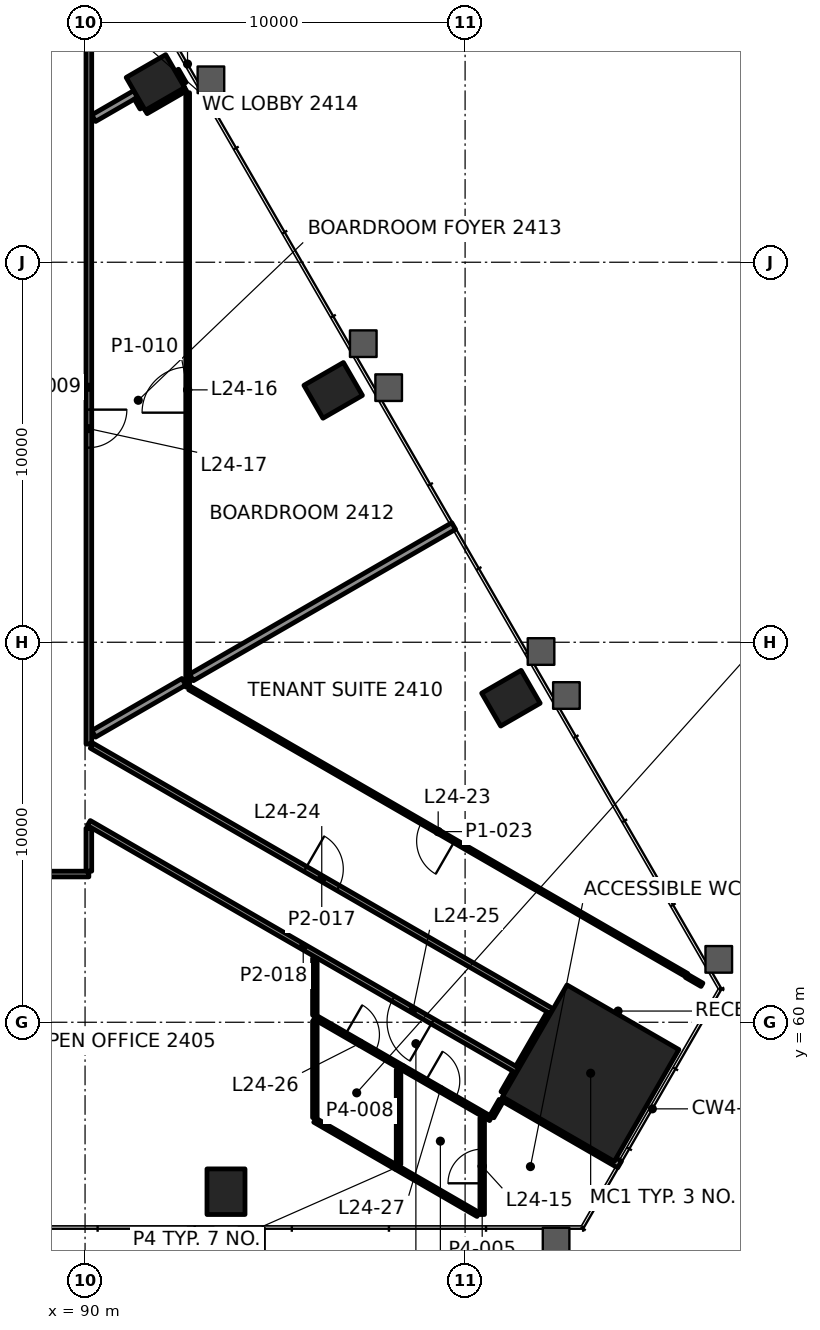
"""IFC4 building model, lengths in metres.
Left out: names, types, materials, properties, quantities, classifications, styles, units other than length and angle.
Written with IfcOpenShell. Run it as: python <this file> out.ifc"""

import sys

from ifc_helpers import new_model, si_unit, direction, frame, frame_2d, origin, origin_2d, place, context, subcontext, project, spatial, rectangle, extrude, element, fill, save


model = new_model("IFC4")
c1 = context("Model", 3, precision=1e-05, world=origin(), true_north=direction((0.0, 1.0)))
c2 = subcontext(c1, "Body", "Model", "MODEL_VIEW")
j1 = project(units=[si_unit("LENGTHUNIT", "METRE"), si_unit("PLANEANGLEUNIT", "RADIAN")], contexts=[c1])
p1 = place(None, origin())
s1 = spatial("IfcSite", under=j1, at=p1, CompositionType="ELEMENT")
p2 = place(p1, origin())
s2 = spatial("IfcBuilding", under=s1, at=p2, CompositionType="ELEMENT")
p3 = place(p2, frame((0.0, 0.0, 107.2)))
s3 = spatial("IfcBuildingStorey", under=s2, at=p3, CompositionType="ELEMENT", Elevation=107.2)
p4 = place(p3, frame((103.304, 58.659, 0.0), z_axis=(0.0, 0.0, 1.0), x_axis=(0.5, 0.866025403784, 0.0)))
e1 = element("IfcColumn", 1, at=p4, inside=s3, PredefinedType="COLUMN", context=c2, shape_type="SweptSolid", body=[
    extrude(rectangle(XDim=3.4, YDim=3.4, at=origin_2d()), origin(), (0.0, 0.0, 1.0), 4.2),
])
for number, where, z_axis, x_axis in (
    (2, (93.708, 55.541, -0.0), (0.0, 0.0, 1.0), (1.0, 0.0, 0.0)),
    (3, (101.206, 68.528, -0.0), (0.0, 0.0, 1.0), (-0.5, 0.866, 0.0)),
    (4, (96.529, 76.628, -0.0), (0.0, 0.0, 1.0), (-0.5, 0.866, 0.0)),
    (5, (91.852, 84.729, -0.0), (0.0, 0.0, 1.0), (-0.5, 0.866, 0.0)),
):
    element("IfcColumn", number, at=place(p3, frame(where, z_axis=z_axis, x_axis=x_axis)), inside=s3, PredefinedType="COLUMN", context=c2, shape_type="SweptSolid", body=[
        extrude(rectangle(XDim=1.0, YDim=1.2, at=origin_2d()), origin(), (0.0, 0.0, 1.0), 4.2),
    ])
p5 = place(p3, frame((90.099, 63.9, 0.0), z_axis=(0.0, 0.0, 1.0), x_axis=(-1.0, 0.0, 0.0)))
e6 = element("IfcWall", 6, at=p5, inside=s3, PredefinedType="PARTITIONING", context=c2, shape_type="SweptSolid", body=[
    extrude(rectangle(XDim=30.199, YDim=0.15, at=frame_2d((15.099, 0.0))), origin(), (0.0, 0.0, 1.0), 3.4),
])
p6 = place(p5, frame((5.882, 0.0, 0.0)))
e7 = element("IfcOpeningElement", 7, at=p6, cuts=e6, PredefinedType="OPENING", context=c2, shape_type="SweptSolid", body=[
    extrude(rectangle(XDim=1.2, YDim=2.1, at=frame_2d((0.6, 1.05))), frame((0.0, 0.085, 0.0), z_axis=(0.0, -1.0, 0.0), x_axis=(1.0, 0.0, 0.0)), (0.0, 0.0, 1.0), 0.17),
])
p7 = place(p5, frame((20.346, 0.0, 0.0)))
e8 = element("IfcOpeningElement", 8, at=p7, cuts=e6, PredefinedType="OPENING", context=c2, shape_type="SweptSolid", body=[
    extrude(rectangle(XDim=1.2, YDim=2.1, at=frame_2d((0.6, 1.05))), frame((0.0, 0.085, 0.0), z_axis=(0.0, -1.0, 0.0), x_axis=(1.0, 0.0, 0.0)), (0.0, 0.0, 1.0), 0.17),
])
p8 = place(p3, frame((90.227, 67.59, 0.0), z_axis=(0.0, 0.0, 1.0), x_axis=(0.866003105128, 0.500038620418, 0.0)))
e9 = element("IfcWall", 9, at=p8, inside=s3, PredefinedType="PARTITIONING", context=c2, shape_type="SweptSolid", body=[
    extrude(rectangle(XDim=2.74, YDim=0.2, at=frame_2d((1.37, 0.0))), origin(), (0.0, 0.0, 1.0), 3.4),
])
p9 = place(p3, frame((91.583, 83.997, 0.0), z_axis=(0.0, 0.0, 1.0), x_axis=(0.866066905393, 0.499928110214, 0.0)))
e10 = element("IfcWall", 10, at=p9, inside=s3, PredefinedType="PARTITIONING", context=c2, shape_type="SweptSolid", body=[
    extrude(rectangle(XDim=1.199, YDim=0.2, at=frame_2d((0.6, 0.0))), origin(), (0.0, 0.0, 1.0), 3.165),
])
p10 = place(p3, frame((90.227, 83.792, 0.0), z_axis=(0.0, 0.0, 1.0), x_axis=(0.866067665301, 0.499926793761, 0.0)))
e11 = element("IfcWall", 11, at=p10, inside=s3, PredefinedType="PARTITIONING", context=c2, shape_type="SweptSolid", body=[
    extrude(rectangle(XDim=1.276, YDim=0.2, at=frame_2d((0.638, 0.0))), origin(), (0.0, 0.0, 1.0), 3.4),
])
p11 = place(p3, frame((100.704, 57.516, 0.0), z_axis=(0.0, 0.0, 1.0), x_axis=(0.499679281737, 0.866210491395, 0.0)))
e12 = element("IfcWall", 12, at=p11, inside=s3, PredefinedType="PARTITIONING", context=c2, shape_type="SweptSolid", body=[
    extrude(rectangle(XDim=0.49, YDim=0.12, at=frame_2d((0.245, 0.0))), origin(), (0.0, 0.0, 1.0), 3.4),
])
p12 = place(p3, frame((101.031, 58.124, 0.0), z_axis=(0.0, 0.0, 1.0), x_axis=(0.500049599607, 0.865996765544, 0.0)))
e13 = element("IfcWall", 13, at=p12, inside=s3, PredefinedType="PARTITIONING", context=c2, shape_type="SweptSolid", body=[
    extrude(rectangle(XDim=0.625, YDim=0.2, at=frame_2d((0.312, 0.0))), origin(), (0.0, 0.0, 1.0), 3.4),
])
p13 = place(p3, frame((100.45, 54.941, 0.0), z_axis=(0.0, 0.0, 1.0), x_axis=(0.0, 1.0, 0.0)))
e14 = element("IfcWall", 14, at=p13, inside=s3, PredefinedType="PARTITIONING", context=c2, shape_type="SweptSolid", body=[
    extrude(rectangle(XDim=2.542, YDim=0.12, at=frame_2d((1.271, 0.0))), origin(), (0.0, 0.0, 1.0), 3.4),
])
p14 = place(p13, frame((0.821, 0.0, 0.0)))
e15 = element("IfcOpeningElement", 15, at=p14, cuts=e14, PredefinedType="OPENING", context=c2, shape_type="SweptSolid", body=[
    extrude(rectangle(XDim=0.9, YDim=2.1, at=frame_2d((0.45, 1.05))), frame((0.0, 0.07, 0.0), z_axis=(0.0, -1.0, 0.0), x_axis=(1.0, 0.0, 0.0)), (0.0, 0.0, 1.0), 0.14),
])
p15 = place(p3, frame((98.249, 56.26, 0.0), z_axis=(0.0, 0.0, 1.0), x_axis=(0.0, 1.0, 0.0)))
e16 = element("IfcWall", 16, at=p15, inside=s3, PredefinedType="PARTITIONING", context=c2, shape_type="SweptSolid", body=[
    extrude(rectangle(XDim=2.495, YDim=0.12, at=frame_2d((1.248, 0.0))), origin(), (0.0, 0.0, 1.0), 3.4),
])
p16 = place(p3, frame((96.047, 57.491, 0.0), z_axis=(0.0, 0.0, 1.0), x_axis=(0.0, 1.0, 0.0)))
e17 = element("IfcWall", 17, at=p16, inside=s3, PredefinedType="PARTITIONING", context=c2, shape_type="SweptSolid", body=[
    extrude(rectangle(XDim=2.541, YDim=0.12, at=frame_2d((1.27, 0.0))), origin(), (0.0, 0.0, 1.0), 3.4),
])
p17 = place(p3, frame((92.7, 68.823, 0.0), z_axis=(0.0, 0.0, 1.0), x_axis=(0.0, 1.0, 0.0)))
e18 = element("IfcWall", 18, at=p17, inside=s3, PredefinedType="PARTITIONING", context=c2, shape_type="SweptSolid", body=[
    extrude(rectangle(XDim=15.638, YDim=0.1, at=frame_2d((7.819, 0.0))), origin(), (0.0, 0.0, 1.0), 3.165),
])
p18 = place(p17, frame((7.219, 0.0, 0.0)))
e19 = element("IfcOpeningElement", 19, at=p18, cuts=e18, PredefinedType="OPENING", context=c2, shape_type="SweptSolid", body=[
    extrude(rectangle(XDim=1.2, YDim=2.1, at=frame_2d((0.6, 1.05))), frame((0.0, 0.06, 0.0), z_axis=(0.0, -1.0, 0.0), x_axis=(1.0, 0.0, 0.0)), (0.0, 0.0, 1.0), 0.12),
])
p19 = place(p3, frame((90.1, 63.976, 0.0), z_axis=(0.0, 0.0, 1.0), x_axis=(0.0, 1.0, 0.0)))
e20 = element("IfcWall", 20, at=p19, inside=s3, PredefinedType="PARTITIONING", context=c2, shape_type="SweptSolid", body=[
    extrude(rectangle(XDim=1.131, YDim=0.15, at=frame_2d((0.565, 0.0))), origin(), (0.0, 0.0, 1.0), 3.247),
])
p20 = place(p3, frame((90.1, 86.1, 0.0), z_axis=(0.0, 0.0, 1.0), x_axis=(0.0, -1.0, 0.0)))
e21 = element("IfcWall", 21, at=p20, inside=s3, PredefinedType="PARTITIONING", context=c2, shape_type="SweptSolid", body=[
    extrude(rectangle(XDim=18.778, YDim=0.15, at=frame_2d((9.389, 0.0))), origin(), (0.0, 0.0, 1.0), 3.4),
])
p21 = place(p20, frame((9.978, 0.0, 0.0)))
e22 = element("IfcOpeningElement", 22, at=p21, cuts=e21, PredefinedType="OPENING", context=c2, shape_type="SweptSolid", body=[
    extrude(rectangle(XDim=1.0, YDim=2.1, at=frame_2d((0.5, 1.05))), frame((0.0, 0.085, 0.0), z_axis=(0.0, -1.0, 0.0), x_axis=(1.0, 0.0, 0.0)), (0.0, 0.0, 1.0), 0.17),
])
p22 = place(p3, frame((92.572, 84.684, 0.0), z_axis=(0.0, 0.0, 1.0), x_axis=(-0.500216468111, 0.865900389786, 0.0)))
e23 = element("IfcWall", 23, at=p22, inside=s3, PredefinedType="PARTITIONING", context=c2, shape_type="SweptSolid", body=[
    extrude(rectangle(XDim=0.399, YDim=0.2, at=frame_2d((0.2, 0.0))), origin(), (0.0, 0.0, 1.0), 3.4),
])
p23 = place(p3, frame((91.532, 84.083, 0.0), z_axis=(0.0, 0.0, 1.0), x_axis=(-0.49965177357, 0.866226359082, 0.0)))
e24 = element("IfcWall", 24, at=p23, inside=s3, PredefinedType="PARTITIONING", context=c2, shape_type="SweptSolid", body=[
    extrude(rectangle(XDim=0.299, YDim=0.2, at=frame_2d((0.149, 0.0))), origin(), (0.0, 0.0, 1.0), 3.4),
])
p24 = place(p3, frame((105.833, 61.24, 0.0), z_axis=(0.0, 0.0, 1.0), x_axis=(-0.866025727262, 0.499999439721, 0.0)))
e25 = element("IfcWall", 25, at=p24, inside=s3, PredefinedType="PARTITIONING", context=c2, shape_type="SweptSolid", body=[
    extrude(rectangle(XDim=15.107, YDim=0.1, at=frame_2d((7.553, 0.0))), origin(), (0.0, 0.0, 1.0), 3.4),
])
p25 = place(p24, frame((7.053, 0.0, 0.0)))
e26 = element("IfcOpeningElement", 26, at=p25, cuts=e25, PredefinedType="OPENING", context=c2, shape_type="SweptSolid", body=[
    extrude(rectangle(XDim=1.0, YDim=2.1, at=frame_2d((0.5, 1.05))), frame((0.0, 0.06, 0.0), z_axis=(0.0, -1.0, 0.0), x_axis=(1.0, 0.0, 0.0)), (0.0, 0.0, 1.0), 0.12),
])
p26 = place(p3, frame((106.233, 60.986, 0.0), z_axis=(0.0, 0.0, 1.0), x_axis=(-0.866073792734, 0.499916178513, 0.0)))
e27 = element("IfcWall", 27, at=p26, inside=s3, PredefinedType="PARTITIONING", context=c2, shape_type="SweptSolid", body=[
    extrude(rectangle(XDim=0.473, YDim=0.1, at=frame_2d((0.236, 0.0))), origin(), (0.0, 0.0, 1.0), 3.4),
])
p27 = place(p3, frame((90.175, 67.278, 0.0), z_axis=(0.0, 0.0, 1.0), x_axis=(0.866025916507, -0.499999111938, 0.0)))
e28 = element("IfcWall", 28, at=p27, inside=s3, PredefinedType="PARTITIONING", context=c2, shape_type="SweptSolid", body=[
    extrude(rectangle(XDim=13.979, YDim=0.15, at=frame_2d((6.99, 0.0))), origin(), (0.0, 0.0, 1.0), 3.4),
])
p28 = place(p27, frame((6.49, 0.0, 0.0)))
e29 = element("IfcOpeningElement", 29, at=p28, cuts=e28, PredefinedType="OPENING", context=c2, shape_type="SweptSolid", body=[
    extrude(rectangle(XDim=1.0, YDim=2.1, at=frame_2d((0.5, 1.05))), frame((0.0, 0.085, 0.0), z_axis=(0.0, -1.0, 0.0), x_axis=(1.0, 0.0, 0.0)), (0.0, 0.0, 1.0), 0.17),
])
p29 = place(p3, frame((101.382, 58.729, 0.0), z_axis=(0.0, 0.0, 1.0), x_axis=(-0.866023606965, 0.500003112169, 0.0)))
e30 = element("IfcWall", 30, at=p29, inside=s3, PredefinedType="PARTITIONING", context=c2, shape_type="SweptSolid", body=[
    extrude(rectangle(XDim=13.027, YDim=0.15, at=frame_2d((6.513, 0.0))), origin(), (0.0, 0.0, 1.0), 3.247),
])
p30 = place(p29, frame((2.581, 0.0, 0.0)))
e31 = element("IfcOpeningElement", 31, at=p30, cuts=e30, PredefinedType="OPENING", context=c2, shape_type="SweptSolid", body=[
    extrude(rectangle(XDim=1.2, YDim=2.1, at=frame_2d((0.6, 1.05))), frame((0.0, 0.085, 0.0), z_axis=(0.0, -1.0, 0.0), x_axis=(1.0, 0.0, 0.0)), (0.0, 0.0, 1.0), 0.17),
])
p31 = place(p3, frame((104.065, 56.257, 0.0), z_axis=(0.0, 0.0, 1.0), x_axis=(-0.866034141321, 0.499984865837, 0.0)))
e32 = element("IfcWall", 32, at=p31, inside=s3, PredefinedType="PARTITIONING", context=c2, shape_type="SweptSolid", body=[
    extrude(rectangle(XDim=3.543, YDim=0.2, at=frame_2d((1.772, 0.0))), origin(), (0.0, 0.0, 1.0), 3.4),
])
p32 = place(p3, frame((96.047, 60.135, 0.0), z_axis=(0.0, 0.0, 1.0), x_axis=(0.866018138487, -0.500012583653, 0.0)))
e33 = element("IfcWall", 33, at=p32, inside=s3, PredefinedType="PARTITIONING", context=c2, shape_type="SweptSolid", body=[
    extrude(rectangle(XDim=5.342, YDim=0.12, at=frame_2d((2.671, 0.0))), origin(), (0.0, 0.0, 1.0), 3.4),
])
p33 = place(p32, frame((0.923, 0.0, 0.0)))
e34 = element("IfcOpeningElement", 34, at=p33, cuts=e33, PredefinedType="OPENING", context=c2, shape_type="SweptSolid", body=[
    extrude(rectangle(XDim=0.9, YDim=2.1, at=frame_2d((0.45, 1.05))), frame((0.0, 0.07, 0.0), z_axis=(0.0, -1.0, 0.0), x_axis=(1.0, 0.0, 0.0)), (0.0, 0.0, 1.0), 0.14),
])
p34 = place(p32, frame((3.364, 0.0, 0.0)))
e35 = element("IfcOpeningElement", 35, at=p34, cuts=e33, PredefinedType="OPENING", context=c2, shape_type="SweptSolid", body=[
    extrude(rectangle(XDim=0.9, YDim=2.1, at=frame_2d((0.45, 1.05))), frame((0.0, 0.07, 0.0), z_axis=(0.0, -1.0, 0.0), x_axis=(1.0, 0.0, 0.0)), (0.0, 0.0, 1.0), 0.14),
])
p35 = place(p3, frame((100.343, 54.941, 0.0), z_axis=(0.0, 0.0, 1.0), x_axis=(-0.866005271205, 0.500034869029, 0.0)))
e36 = element("IfcWall", 36, at=p35, inside=s3, PredefinedType="PARTITIONING", context=c2, shape_type="SweptSolid", body=[
    extrude(rectangle(XDim=4.961, YDim=0.12, at=frame_2d((2.48, 0.0))), origin(), (0.0, 0.0, 1.0), 3.4),
])
p36 = place(p3, frame((92.8, 69.075, 0.0), z_axis=(0.0, 0.0, 1.0), x_axis=(0.866027879581, 0.49999571177, 0.0)))
e37 = element("IfcWall", 37, at=p36, inside=s3, PredefinedType="PARTITIONING", context=c2, shape_type="SweptSolid", body=[
    extrude(rectangle(XDim=7.966, YDim=0.2, at=frame_2d((3.983, 0.0))), origin(), (0.0, 0.0, 1.0), 3.165),
])
p37 = place(p3, frame((101.419, 58.795, 0.0), z_axis=(0.0, 0.0, 1.0), x_axis=(0.499944585209, 0.866057395165, 0.0)))
e38 = element("IfcWall", 38, at=p37, inside=s3, PredefinedType="PARTITIONING", context=c2, shape_type="SweptSolid", body=[
    extrude(rectangle(XDim=1.649, YDim=0.2, at=frame_2d((0.825, 0.0))), origin(), (0.0, 0.0, 1.0), 3.247),
])
p38 = place(p3, frame((96.047, 60.187, 0.0), z_axis=(0.0, 0.0, 1.0), x_axis=(0.0, 1.0, 0.0)))
e39 = element("IfcWall", 39, at=p38, inside=s3, PredefinedType="PARTITIONING", context=c2, shape_type="SweptSolid", body=[
    extrude(rectangle(XDim=1.496, YDim=0.12, at=frame_2d((0.748, 0.0))), origin(), (0.0, 0.0, 1.0), 3.4),
])
p39 = place(p14, origin())
e40 = element("IfcDoor", 40, at=p39, inside=s3, OperationType="SINGLE_SWING_RIGHT", PredefinedType="DOOR", context=c2, shape_type="SweptSolid", body=[
    extrude(rectangle(XDim=0.9, YDim=2.1, at=frame_2d((0.45, 1.05))), frame((0.0, 0.025, 0.0), z_axis=(0.0, -1.0, 0.0), x_axis=(1.0, 0.0, 0.0)), (0.0, 0.0, 1.0), 0.05),
])
fill(e15, e40)
p40 = place(p18, origin())
e41 = element("IfcDoor", 41, at=p40, inside=s3, OperationType="DOUBLE_DOOR_SINGLE_SWING", PredefinedType="DOOR", context=c2, shape_type="SweptSolid", body=[
    extrude(rectangle(XDim=1.2, YDim=2.1, at=frame_2d((0.6, 1.05))), frame((0.0, 0.025, 0.0), z_axis=(0.0, -1.0, 0.0), x_axis=(1.0, 0.0, 0.0)), (0.0, 0.0, 1.0), 0.05),
])
fill(e19, e41)
p41 = place(p21, origin())
e42 = element("IfcDoor", 42, at=p41, inside=s3, OperationType="SINGLE_SWING_LEFT", PredefinedType="DOOR", context=c2, shape_type="SweptSolid", body=[
    extrude(rectangle(XDim=1.0, YDim=2.1, at=frame_2d((0.5, 1.05))), frame((0.0, 0.025, 0.0), z_axis=(0.0, -1.0, 0.0), x_axis=(1.0, 0.0, 0.0)), (0.0, 0.0, 1.0), 0.05),
])
fill(e22, e42)
p42 = place(p25, origin())
e43 = element("IfcDoor", 43, at=p42, inside=s3, OperationType="SINGLE_SWING_LEFT", PredefinedType="DOOR", context=c2, shape_type="SweptSolid", body=[
    extrude(rectangle(XDim=1.0, YDim=2.1, at=frame_2d((0.5, 1.05))), frame((0.0, 0.025, 0.0), z_axis=(0.0, -1.0, 0.0), x_axis=(1.0, 0.0, 0.0)), (0.0, 0.0, 1.0), 0.05),
])
fill(e26, e43)
p43 = place(p28, origin())
e44 = element("IfcDoor", 44, at=p43, inside=s3, OperationType="SINGLE_SWING_LEFT", PredefinedType="DOOR", context=c2, shape_type="SweptSolid", body=[
    extrude(rectangle(XDim=1.0, YDim=2.1, at=frame_2d((0.5, 1.05))), frame((0.0, 0.025, 0.0), z_axis=(0.0, -1.0, 0.0), x_axis=(1.0, 0.0, 0.0)), (0.0, 0.0, 1.0), 0.05),
])
fill(e29, e44)
p44 = place(p30, origin())
e45 = element("IfcDoor", 45, at=p44, inside=s3, OperationType="DOUBLE_DOOR_SINGLE_SWING", PredefinedType="DOOR", context=c2, shape_type="SweptSolid", body=[
    extrude(rectangle(XDim=1.2, YDim=2.1, at=frame_2d((0.6, 1.05))), frame((0.0, 0.025, 0.0), z_axis=(0.0, -1.0, 0.0), x_axis=(1.0, 0.0, 0.0)), (0.0, 0.0, 1.0), 0.05),
])
fill(e31, e45)
p45 = place(p33, origin())
e46 = element("IfcDoor", 46, at=p45, inside=s3, OperationType="SINGLE_SWING_LEFT", PredefinedType="DOOR", context=c2, shape_type="SweptSolid", body=[
    extrude(rectangle(XDim=0.9, YDim=2.1, at=frame_2d((0.45, 1.05))), frame((0.0, 0.025, 0.0), z_axis=(0.0, -1.0, 0.0), x_axis=(1.0, 0.0, 0.0)), (0.0, 0.0, 1.0), 0.05),
])
fill(e34, e46)
p46 = place(p34, origin())
e47 = element("IfcDoor", 47, at=p46, inside=s3, OperationType="SINGLE_SWING_RIGHT", PredefinedType="DOOR", context=c2, shape_type="SweptSolid", body=[
    extrude(rectangle(XDim=0.9, YDim=2.1, at=frame_2d((0.45, 1.05))), frame((0.0, 0.025, 0.0), z_axis=(0.0, -1.0, 0.0), x_axis=(1.0, 0.0, 0.0)), (0.0, 0.0, 1.0), 0.05),
])
fill(e35, e47)
save(model, sys.argv[1])
